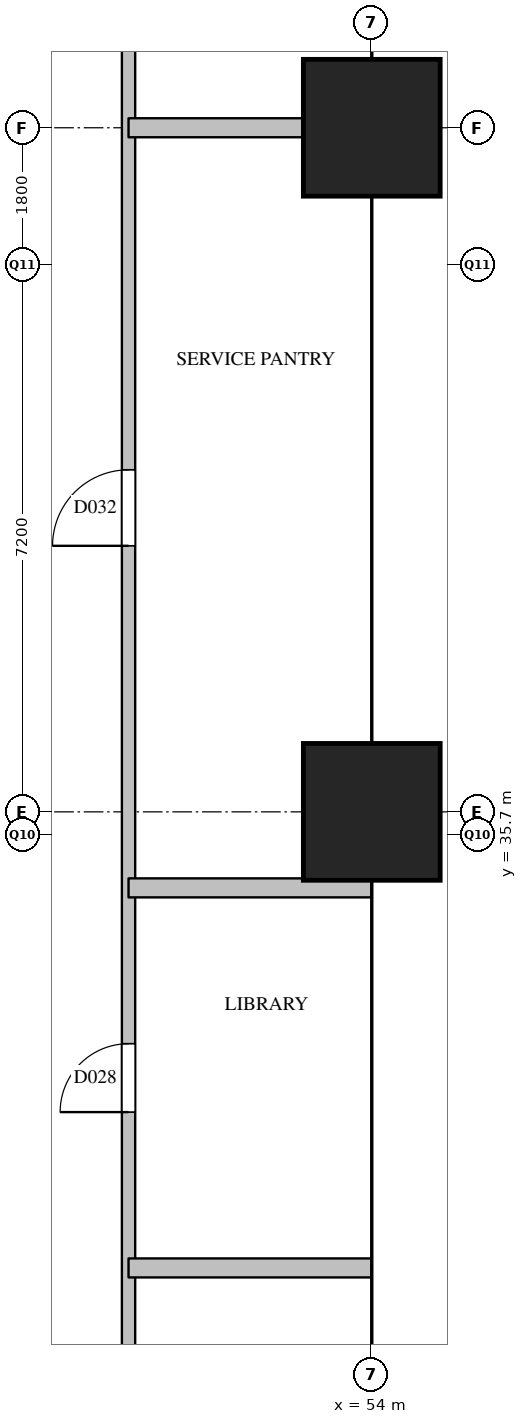
"""IFC4 building model, lengths in metres.
Left out: names, types, materials, properties, quantities, classifications, styles, units other than length and angle.
Written with IfcOpenShell. Run it as: python <this file> out.ifc"""

import sys

from ifc_helpers import new_model, si_unit, direction, frame, frame_2d, origin, origin_2d, place, context, subcontext, project, spatial, rectangle, extrude, element, fill, save


model = new_model("IFC4")
c1 = context("Model", 3, precision=1e-05, world=origin(), true_north=direction((0.0, 1.0)))
c2 = subcontext(c1, "Body", "Model", "MODEL_VIEW")
j1 = project(units=[si_unit("LENGTHUNIT", "METRE"), si_unit("PLANEANGLEUNIT", "RADIAN")], contexts=[c1])
p1 = place(None, origin())
s1 = spatial("IfcSite", under=j1, at=p1, CompositionType="ELEMENT")
p2 = place(p1, origin())
s2 = spatial("IfcBuilding", under=s1, at=p2, CompositionType="ELEMENT")
p3 = place(p2, frame((0.0, 0.0, 50.0)))
s3 = spatial("IfcBuildingStorey", under=s2, at=p3, CompositionType="ELEMENT", Elevation=50.0)
for number, where, z_axis, x_axis in (
    (1, (54.0, 36.0, 0.0), (0.0, 0.0, 1.0), (1.0, 0.0, 0.0)),
    (2, (54.0, 45.0, 0.0), (0.0, 0.0, 1.0), (1.0, 0.0, 0.0)),
):
    element("IfcColumn", number, at=place(p3, frame(where, z_axis=z_axis, x_axis=x_axis)), inside=s3, PredefinedType="COLUMN", context=c2, shape_type="SweptSolid", body=[
        extrude(rectangle(XDim=1.8, YDim=1.8, at=origin_2d()), origin(), (0.0, 0.0, 1.0), 3.8),
    ])
p4 = place(p3, frame((50.8, 26.1, 0.0), z_axis=(0.0, 0.0, 1.0), x_axis=(0.0, 1.0, 0.0)))
e3 = element("IfcWall", 3, at=p4, inside=s3, PredefinedType="PARTITIONING", context=c2, shape_type="SweptSolid", body=[
    extrude(rectangle(XDim=26.3, YDim=0.175, at=frame_2d((13.15, 0.0))), origin(), (0.0, 0.0, 1.0), 2.5),
])
p5 = place(p4, frame((5.95, 0.0, 0.0)))
e4 = element("IfcOpeningElement", 4, at=p5, cuts=e3, PredefinedType="OPENING", context=c2, shape_type="SweptSolid", body=[
    extrude(rectangle(XDim=0.9, YDim=2.1, at=frame_2d((0.45, 1.05))), frame((0.0, 0.097, 0.0), z_axis=(0.0, -1.0, 0.0), x_axis=(1.0, 0.0, 0.0)), (0.0, 0.0, 1.0), 0.195),
])
p6 = place(p4, frame((13.4, 0.0, 0.0)))
e5 = element("IfcOpeningElement", 5, at=p6, cuts=e3, PredefinedType="OPENING", context=c2, shape_type="SweptSolid", body=[
    extrude(rectangle(XDim=1.0, YDim=2.1, at=frame_2d((0.5, 1.05))), frame((0.0, 0.097, 0.0), z_axis=(0.0, -1.0, 0.0), x_axis=(1.0, 0.0, 0.0)), (0.0, 0.0, 1.0), 0.195),
])
p7 = place(p4, frame((22.15, 0.0, 0.0)))
e6 = element("IfcOpeningElement", 6, at=p7, cuts=e3, PredefinedType="OPENING", context=c2, shape_type="SweptSolid", body=[
    extrude(rectangle(XDim=0.9, YDim=2.1, at=frame_2d((0.45, 1.05))), frame((0.0, 0.097, 0.0), z_axis=(0.0, -1.0, 0.0), x_axis=(1.0, 0.0, 0.0)), (0.0, 0.0, 1.0), 0.195),
])
for number, where, z_axis, x_axis in (
    (7, (50.8, 30.0, 0.0), (0.0, 0.0, 1.0), (1.0, 0.0, 0.0)),
    (8, (50.8, 35.0, 0.0), (0.0, 0.0, 1.0), (1.0, 0.0, 0.0)),
):
    element("IfcWall", number, at=place(p3, frame(where, z_axis=z_axis, x_axis=x_axis)), inside=s3, PredefinedType="PARTITIONING", context=c2, shape_type="SweptSolid", body=[
        extrude(rectangle(XDim=3.2, YDim=0.25, at=frame_2d((1.6, 0.0))), origin(), (0.0, 0.0, 1.0), 2.5),
    ])
p8 = place(p3, frame((50.8, 45.0, 0.0), z_axis=(0.0, 0.0, 1.0), x_axis=(1.0, 0.0, 0.0)))
e9 = element("IfcWall", 9, at=p8, inside=s3, PredefinedType="PARTITIONING", context=c2, shape_type="SweptSolid", body=[
    extrude(rectangle(XDim=3.2, YDim=0.25, at=frame_2d((1.6, 0.0))), origin(), (0.0, 0.0, 1.0), 3.5),
])
p9 = place(p5, origin())
e10 = element("IfcDoor", 10, at=p9, inside=s3, OperationType="SINGLE_SWING_LEFT", PredefinedType="DOOR", context=c2, shape_type="SweptSolid", body=[
    extrude(rectangle(XDim=0.9, YDim=2.1, at=frame_2d((0.45, 1.05))), frame((0.0, 0.025, 0.0), z_axis=(0.0, -1.0, 0.0), x_axis=(1.0, 0.0, 0.0)), (0.0, 0.0, 1.0), 0.05),
])
fill(e4, e10)
p10 = place(p6, origin())
e11 = element("IfcDoor", 11, at=p10, inside=s3, OperationType="SINGLE_SWING_LEFT", PredefinedType="DOOR", context=c2, shape_type="SweptSolid", body=[
    extrude(rectangle(XDim=1.0, YDim=2.1, at=frame_2d((0.5, 1.05))), frame((0.0, 0.025, 0.0), z_axis=(0.0, -1.0, 0.0), x_axis=(1.0, 0.0, 0.0)), (0.0, 0.0, 1.0), 0.05),
])
fill(e5, e11)
save(model, sys.argv[1])
